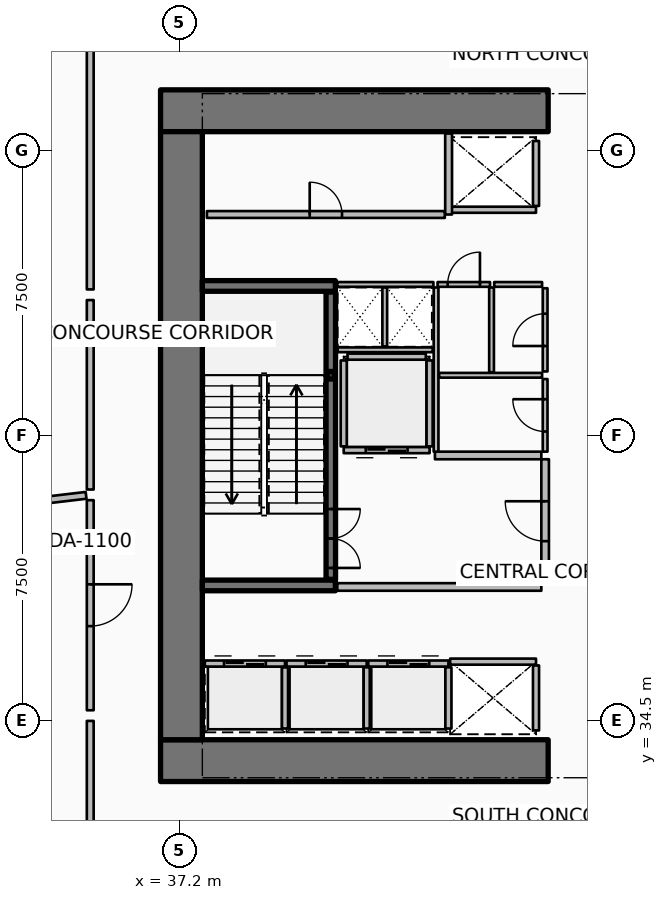
"""IFC4 building model, lengths in metres.
Left out: names, types, materials, properties, quantities, classifications, styles, units other than length and angle.
Written with IfcOpenShell. Run it as: python <this file> out.ifc"""

import sys

from ifc_helpers import new_model, si_unit, direction, frame, frame_2d, origin, origin_2d, place, context, subcontext, project, spatial, rectangle, hollow_rectangle, extrude, element, fill, save


model = new_model("IFC4")
c1 = context("Model", 3, precision=1e-05, world=origin(), true_north=direction((0.0, 1.0)))
c2 = subcontext(c1, "Body", "Model", "MODEL_VIEW")
j1 = project(units=[si_unit("LENGTHUNIT", "METRE"), si_unit("PLANEANGLEUNIT", "RADIAN")], contexts=[c1])
p1 = place(None, origin())
s1 = spatial("IfcSite", under=j1, at=p1, CompositionType="ELEMENT")
p2 = place(p1, origin())
s2 = spatial("IfcBuilding", under=s1, at=p2, CompositionType="ELEMENT")
p3 = place(p2, frame((0.0, 0.0, 16.8)))
s3 = spatial("IfcBuildingStorey", under=s2, at=p3, CompositionType="ELEMENT", Elevation=16.8)
for number, where, z_axis, x_axis in (
    (1, (36.7, 33.45, 0.0), (0.0, 0.0, 1.0), (1.0, 0.0, 0.0)),
    (2, (36.7, 50.55, 0.0), (0.0, 0.0, 1.0), (1.0, 0.0, 0.0)),
):
    element("IfcWall", number, at=place(p3, frame(where, z_axis=z_axis, x_axis=x_axis)), inside=s3, PredefinedType="SHEAR", context=c2, shape_type="SweptSolid", body=[
        extrude(rectangle(XDim=10.2, YDim=1.1, at=frame_2d((5.1, 0.0))), origin(), (0.0, 0.0, 1.0), 4.8),
    ])
p4 = place(p3, frame((37.25, 34.0, 0.0), z_axis=(0.0, 0.0, 1.0), x_axis=(0.0, 1.0, 0.0)))
e3 = element("IfcWall", 3, at=p4, inside=s3, PredefinedType="SHEAR", context=c2, shape_type="SweptSolid", body=[
    extrude(rectangle(XDim=16.0, YDim=1.1, at=frame_2d((8.0, 0.0))), origin(), (0.0, 0.0, 1.0), 4.8),
])
for number, where, z_axis, x_axis in (
    (4, (37.8, 38.06, 0.0), (0.0, 0.0, 1.0), (1.0, 0.0, 0.0)),
    (5, (37.8, 45.94, 0.0), (0.0, 0.0, 1.0), (1.0, 0.0, 0.0)),
):
    element("IfcWall", number, at=place(p3, frame(where, z_axis=z_axis, x_axis=x_axis)), inside=s3, PredefinedType="SHEAR", context=c2, shape_type="SweptSolid", body=[
        extrude(rectangle(XDim=3.5, YDim=0.28, at=frame_2d((1.75, 0.0))), origin(), (0.0, 0.0, 1.0), 4.8),
    ])
p5 = place(p3, frame((41.18, 43.59, 0.0), z_axis=(0.0, 0.0, 1.0), x_axis=(1.0, 0.0, 0.0)))
e6 = element("IfcColumn", 6, at=p5, inside=s3, PredefinedType="COLUMN", context=c2, shape_type="SweptSolid", body=[
    extrude(hollow_rectangle(XDim=0.2, YDim=0.2, WallThickness=0.01, InnerFilletRadius=0.01, OuterFilletRadius=0.02, at=origin_2d()), origin(), (0.0, 0.0, 1.0), 2.195),
])
p6 = place(p3, frame((41.18, 38.22, 0.0), z_axis=(0.0, 0.0, 1.0), x_axis=(0.0, 1.0, 0.0)))
e7 = element("IfcWall", 7, at=p6, inside=s3, PredefinedType="SOLIDWALL", context=c2, shape_type="SweptSolid", body=[
    extrude(rectangle(XDim=7.56, YDim=0.25, at=frame_2d((3.78, 0.0))), origin(), (0.0, 0.0, 1.0), 4.4),
])
p7 = place(p6, frame((0.3, 0.0, 0.0)))
e8 = element("IfcOpeningElement", 8, at=p7, cuts=e7, PredefinedType="OPENING", context=c2, shape_type="SweptSolid", body=[
    extrude(rectangle(XDim=1.55, YDim=2.15, at=frame_2d((0.775, 1.075))), frame((0.0, 0.135, 0.0), z_axis=(0.0, -1.0, 0.0), x_axis=(1.0, 0.0, 0.0)), (0.0, 0.0, 1.0), 0.27),
])
p8 = place(p3, frame((37.865, 36.005, 0.0), z_axis=(0.0, 0.0, 1.0), x_axis=(1.0, 0.0, 0.0)))
e9 = element("IfcWall", 9, at=p8, inside=s3, PredefinedType="PARTITIONING", context=c2, shape_type="SweptSolid", body=[
    extrude(rectangle(XDim=2.11, YDim=0.16, at=frame_2d((1.055, 0.0))), origin(), (0.0, 0.0, 1.0), 4.4),
])
p9 = place(p8, frame((0.505, 0.0, 0.0)))
e10 = element("IfcOpeningElement", 10, at=p9, cuts=e9, PredefinedType="OPENING", context=c2, shape_type="SweptSolid", body=[
    extrude(rectangle(XDim=1.1, YDim=2.1, at=frame_2d((0.55, 1.05))), frame((0.0, 0.09, 0.0), z_axis=(0.0, -1.0, 0.0), x_axis=(1.0, 0.0, 0.0)), (0.0, 0.0, 1.0), 0.18),
])
p10 = place(p3, frame((39.975, 34.295, 0.0), z_axis=(0.0, 0.0, 1.0), x_axis=(0.0, 1.0, 0.0)))
e11 = element("IfcWall", 11, at=p10, inside=s3, PredefinedType="PARTITIONING", context=c2, shape_type="SweptSolid", body=[
    extrude(rectangle(XDim=1.61, YDim=0.16, at=frame_2d((0.805, 0.0))), origin(), (0.0, 0.0, 1.0), 4.4),
])
p11 = place(p3, frame((40.015, 36.005, 0.0), z_axis=(0.0, 0.0, 1.0), x_axis=(1.0, 0.0, 0.0)))
e12 = element("IfcWall", 12, at=p11, inside=s3, PredefinedType="PARTITIONING", context=c2, shape_type="SweptSolid", body=[
    extrude(rectangle(XDim=2.11, YDim=0.16, at=frame_2d((1.055, 0.0))), origin(), (0.0, 0.0, 1.0), 4.4),
])
p12 = place(p11, frame((0.505, 0.0, 0.0)))
e13 = element("IfcOpeningElement", 13, at=p12, cuts=e12, PredefinedType="OPENING", context=c2, shape_type="SweptSolid", body=[
    extrude(rectangle(XDim=1.1, YDim=2.1, at=frame_2d((0.55, 1.05))), frame((0.0, 0.09, 0.0), z_axis=(0.0, -1.0, 0.0), x_axis=(1.0, 0.0, 0.0)), (0.0, 0.0, 1.0), 0.18),
])
p13 = place(p3, frame((42.125, 34.295, 0.0), z_axis=(0.0, 0.0, 1.0), x_axis=(0.0, 1.0, 0.0)))
e14 = element("IfcWall", 14, at=p13, inside=s3, PredefinedType="PARTITIONING", context=c2, shape_type="SweptSolid", body=[
    extrude(rectangle(XDim=1.61, YDim=0.16, at=frame_2d((0.805, 0.0))), origin(), (0.0, 0.0, 1.0), 4.4),
])
p14 = place(p3, frame((42.165, 36.005, 0.0), z_axis=(0.0, 0.0, 1.0), x_axis=(1.0, 0.0, 0.0)))
e15 = element("IfcWall", 15, at=p14, inside=s3, PredefinedType="PARTITIONING", context=c2, shape_type="SweptSolid", body=[
    extrude(rectangle(XDim=2.11, YDim=0.16, at=frame_2d((1.055, 0.0))), origin(), (0.0, 0.0, 1.0), 4.4),
])
p15 = place(p14, frame((0.505, 0.0, 0.0)))
e16 = element("IfcOpeningElement", 16, at=p15, cuts=e15, PredefinedType="OPENING", context=c2, shape_type="SweptSolid", body=[
    extrude(rectangle(XDim=1.1, YDim=2.1, at=frame_2d((0.55, 1.05))), frame((0.0, 0.09, 0.0), z_axis=(0.0, -1.0, 0.0), x_axis=(1.0, 0.0, 0.0)), (0.0, 0.0, 1.0), 0.18),
])
p16 = place(p3, frame((44.275, 34.295, 0.0), z_axis=(0.0, 0.0, 1.0), x_axis=(0.0, 1.0, 0.0)))
e17 = element("IfcWall", 17, at=p16, inside=s3, PredefinedType="PARTITIONING", context=c2, shape_type="SweptSolid", body=[
    extrude(rectangle(XDim=1.61, YDim=0.16, at=frame_2d((0.805, 0.0))), origin(), (0.0, 0.0, 1.0), 4.4),
])
p17 = place(p3, frame((46.58, 47.945, 0.0), z_axis=(0.0, 0.0, 1.0), x_axis=(-1.0, 0.0, 0.0)))
e18 = element("IfcWall", 18, at=p17, inside=s3, PredefinedType="PARTITIONING", context=c2, shape_type="SweptSolid", body=[
    extrude(rectangle(XDim=2.26, YDim=0.16, at=frame_2d((1.13, 0.0))), origin(), (0.0, 0.0, 1.0), 4.4),
])
p18 = place(p3, frame((46.58, 48.045, 0.0), z_axis=(0.0, 0.0, 1.0), x_axis=(0.0, 1.0, 0.0)))
e19 = element("IfcWall", 19, at=p18, inside=s3, PredefinedType="PARTITIONING", context=c2, shape_type="SweptSolid", body=[
    extrude(rectangle(XDim=1.71, YDim=0.16, at=frame_2d((0.855, 0.0))), origin(), (0.0, 0.0, 1.0), 4.4),
])
p19 = place(p3, frame((44.32, 36.055, 0.0), z_axis=(0.0, 0.0, 1.0), x_axis=(1.0, 0.0, 0.0)))
e20 = element("IfcWall", 20, at=p19, inside=s3, PredefinedType="PARTITIONING", context=c2, shape_type="SweptSolid", body=[
    extrude(rectangle(XDim=2.26, YDim=0.16, at=frame_2d((1.13, 0.0))), origin(), (0.0, 0.0, 1.0), 4.4),
])
p20 = place(p3, frame((46.58, 34.245, 0.0), z_axis=(0.0, 0.0, 1.0), x_axis=(0.0, 1.0, 0.0)))
e21 = element("IfcWall", 21, at=p20, inside=s3, PredefinedType="PARTITIONING", context=c2, shape_type="SweptSolid", body=[
    extrude(rectangle(XDim=1.71, YDim=0.16, at=frame_2d((0.855, 0.0))), origin(), (0.0, 0.0, 1.0), 4.4),
])
p21 = place(p3, frame((43.78, 41.62, 0.0), z_axis=(0.0, 0.0, 1.0), x_axis=(-1.0, 0.0, 0.0)))
e22 = element("IfcWall", 22, at=p21, inside=s3, PredefinedType="PARTITIONING", context=c2, shape_type="SweptSolid", body=[
    extrude(rectangle(XDim=2.26, YDim=0.16, at=frame_2d((1.13, 0.0))), origin(), (0.0, 0.0, 1.0), 4.4),
])
p22 = place(p21, frame((0.58, 0.0, 0.0)))
e23 = element("IfcOpeningElement", 23, at=p22, cuts=e22, PredefinedType="OPENING", context=c2, shape_type="SweptSolid", body=[
    extrude(rectangle(XDim=1.1, YDim=2.1, at=frame_2d((0.55, 1.05))), frame((0.0, 0.09, 0.0), z_axis=(0.0, -1.0, 0.0), x_axis=(1.0, 0.0, 0.0)), (0.0, 0.0, 1.0), 0.18),
])
for number, where, z_axis, x_axis in (
    (24, (43.78, 41.72, 0.0), (0.0, 0.0, 1.0), (0.0, 1.0, 0.0)),
    (25, (41.52, 41.72, 0.0), (0.0, 0.0, 1.0), (0.0, 1.0, 0.0)),
):
    element("IfcWall", number, at=place(p3, frame(where, z_axis=z_axis, x_axis=x_axis)), inside=s3, PredefinedType="PARTITIONING", context=c2, shape_type="SweptSolid", body=[
        extrude(rectangle(XDim=2.26, YDim=0.16, at=frame_2d((1.13, 0.0))), origin(), (0.0, 0.0, 1.0), 4.4),
    ])
p23 = place(p3, frame((41.62, 44.08, 0.0), z_axis=(0.0, 0.0, 1.0), x_axis=(1.0, 0.0, 0.0)))
e26 = element("IfcWall", 26, at=p23, inside=s3, PredefinedType="PARTITIONING", context=c2, shape_type="SweptSolid", body=[
    extrude(rectangle(XDim=2.06, YDim=0.16, at=frame_2d((1.03, 0.0))), origin(), (0.0, 0.0, 1.0), 4.4),
])
p24 = place(p3, frame((37.92, 47.82, 0.0), z_axis=(0.0, 0.0, 1.0), x_axis=(1.0, 0.0, 0.0)))
e27 = element("IfcWall", 27, at=p24, inside=s3, PredefinedType="PARTITIONING", context=c2, shape_type="SweptSolid", body=[
    extrude(rectangle(XDim=6.26, YDim=0.18, at=frame_2d((3.13, 0.0))), origin(), (0.0, 0.0, 1.0), 4.4),
])
p25 = place(p24, frame((2.705, 0.0, 0.0)))
e28 = element("IfcOpeningElement", 28, at=p25, cuts=e27, PredefinedType="OPENING", context=c2, shape_type="SweptSolid", body=[
    extrude(rectangle(XDim=0.85, YDim=2.06, at=frame_2d((0.425, 1.03))), frame((0.0, 0.1, 0.0), z_axis=(0.0, -1.0, 0.0), x_axis=(1.0, 0.0, 0.0)), (0.0, 0.0, 1.0), 0.2),
])
p26 = place(p3, frame((44.28, 47.82, 0.0), z_axis=(0.0, 0.0, 1.0), x_axis=(0.0, 1.0, 0.0)))
e29 = element("IfcWall", 29, at=p26, inside=s3, PredefinedType="PARTITIONING", context=c2, shape_type="SweptSolid", body=[
    extrude(rectangle(XDim=2.13, YDim=0.18, at=frame_2d((1.065, 0.0))), origin(), (0.0, 0.0, 1.0), 4.4),
])
p27 = place(p3, frame((41.35, 38.02, 0.0), z_axis=(0.0, 0.0, 1.0), x_axis=(1.0, 0.0, 0.0)))
e30 = element("IfcWall", 30, at=p27, inside=s3, PredefinedType="PARTITIONING", context=c2, shape_type="SweptSolid", body=[
    extrude(rectangle(XDim=5.37, YDim=0.2, at=frame_2d((2.685, 0.0))), origin(), (0.0, 0.0, 1.0), 4.4),
])
p28 = place(p3, frame((43.92, 41.48, 0.0), z_axis=(0.0, 0.0, 1.0), x_axis=(1.0, 0.0, 0.0)))
e31 = element("IfcWall", 31, at=p28, inside=s3, PredefinedType="PARTITIONING", context=c2, shape_type="SweptSolid", body=[
    extrude(rectangle(XDim=2.8, YDim=0.2, at=frame_2d((1.4, 0.0))), origin(), (0.0, 0.0, 1.0), 4.4),
])
p29 = place(p3, frame((46.82, 38.12, 0.0), z_axis=(0.0, 0.0, 1.0), x_axis=(0.0, 1.0, 0.0)))
e32 = element("IfcWall", 32, at=p29, inside=s3, PredefinedType="PARTITIONING", context=c2, shape_type="SweptSolid", body=[
    extrude(rectangle(XDim=3.26, YDim=0.2, at=frame_2d((1.63, 0.0))), origin(), (0.0, 0.0, 1.0), 4.4),
])
p30 = place(p29, frame((1.105, 0.0, 0.0)))
e33 = element("IfcOpeningElement", 33, at=p30, cuts=e32, PredefinedType="OPENING", context=c2, shape_type="SweptSolid", body=[
    extrude(rectangle(XDim=1.05, YDim=2.1, at=frame_2d((0.525, 1.05))), frame((0.0, 0.11, 0.0), z_axis=(0.0, -1.0, 0.0), x_axis=(1.0, 0.0, 0.0)), (0.0, 0.0, 1.0), 0.22),
])
p31 = place(p3, frame((41.36, 44.26, 0.0), z_axis=(0.0, 0.0, 1.0), x_axis=(1.0, 0.0, 0.0)))
e34 = element("IfcWall", 34, at=p31, inside=s3, PredefinedType="PARTITIONING", context=c2, shape_type="SweptSolid", body=[
    extrude(rectangle(XDim=2.5, YDim=0.125, at=frame_2d((1.25, 0.0))), origin(), (0.0, 0.0, 1.0), 3.84),
])
p32 = place(p3, frame((42.6, 44.35, 0.0), z_axis=(0.0, 0.0, 1.0), x_axis=(0.0, 1.0, 0.0)))
e35 = element("IfcWall", 35, at=p32, inside=s3, PredefinedType="PARTITIONING", context=c2, shape_type="SweptSolid", body=[
    extrude(rectangle(XDim=1.55, YDim=0.125, at=frame_2d((0.775, 0.0))), origin(), (0.0, 0.0, 1.0), 3.84),
])
p33 = place(p3, frame((43.95, 41.58, 0.0), z_axis=(0.0, 0.0, 1.0), x_axis=(0.0, 1.0, 0.0)))
e36 = element("IfcWall", 36, at=p33, inside=s3, PredefinedType="PARTITIONING", context=c2, shape_type="SweptSolid", body=[
    extrude(rectangle(XDim=4.32, YDim=0.125, at=frame_2d((2.16, 0.0))), origin(), (0.0, 0.0, 1.0), 3.84),
])
p34 = place(p3, frame((44.03, 43.59, 0.0), z_axis=(0.0, 0.0, 1.0), x_axis=(1.0, 0.0, 0.0)))
e37 = element("IfcWall", 37, at=p34, inside=s3, PredefinedType="PARTITIONING", context=c2, shape_type="SweptSolid", body=[
    extrude(rectangle(XDim=2.71, YDim=0.125, at=frame_2d((1.355, 0.0))), origin(), (0.0, 0.0, 1.0), 3.84),
])
p35 = place(p3, frame((45.41, 43.67, 0.0), z_axis=(0.0, 0.0, 1.0), x_axis=(0.0, 1.0, 0.0)))
e38 = element("IfcWall", 38, at=p35, inside=s3, PredefinedType="PARTITIONING", context=c2, shape_type="SweptSolid", body=[
    extrude(rectangle(XDim=2.23, YDim=0.125, at=frame_2d((1.115, 0.0))), origin(), (0.0, 0.0, 1.0), 3.84),
])
p36 = place(p3, frame((46.82, 41.58, 0.0), z_axis=(0.0, 0.0, 1.0), x_axis=(0.0, 1.0, 0.0)))
e39 = element("IfcWall", 39, at=p36, inside=s3, PredefinedType="PARTITIONING", context=c2, shape_type="SweptSolid", body=[
    extrude(rectangle(XDim=1.91, YDim=0.125, at=frame_2d((0.955, 0.0))), origin(), (0.0, 0.0, 1.0), 3.84),
])
p37 = place(p36, frame((0.53, 0.0, 0.0)))
e40 = element("IfcOpeningElement", 40, at=p37, cuts=e39, PredefinedType="OPENING", context=c2, shape_type="SweptSolid", body=[
    extrude(rectangle(XDim=0.85, YDim=2.06, at=frame_2d((0.425, 1.03))), frame((0.0, 0.073, 0.0), z_axis=(0.0, -1.0, 0.0), x_axis=(1.0, 0.0, 0.0)), (0.0, 0.0, 1.0), 0.145),
])
p38 = place(p3, frame((46.82, 43.69, 0.0), z_axis=(0.0, 0.0, 1.0), x_axis=(0.0, 1.0, 0.0)))
e41 = element("IfcWall", 41, at=p38, inside=s3, PredefinedType="PARTITIONING", context=c2, shape_type="SweptSolid", body=[
    extrude(rectangle(XDim=2.19, YDim=0.125, at=frame_2d((1.095, 0.0))), origin(), (0.0, 0.0, 1.0), 3.84),
])
p39 = place(p38, frame((0.67, 0.0, 0.0)))
e42 = element("IfcOpeningElement", 42, at=p39, cuts=e41, PredefinedType="OPENING", context=c2, shape_type="SweptSolid", body=[
    extrude(rectangle(XDim=0.85, YDim=2.06, at=frame_2d((0.425, 1.03))), frame((0.0, 0.073, 0.0), z_axis=(0.0, -1.0, 0.0), x_axis=(1.0, 0.0, 0.0)), (0.0, 0.0, 1.0), 0.145),
])
p40 = place(p3, frame((41.35, 45.98, 0.0), z_axis=(0.0, 0.0, 1.0), x_axis=(1.0, 0.0, 0.0)))
e43 = element("IfcWall", 43, at=p40, inside=s3, PredefinedType="PARTITIONING", context=c2, shape_type="SweptSolid", body=[
    extrude(rectangle(XDim=2.53, YDim=0.125, at=frame_2d((1.265, 0.0))), origin(), (0.0, 0.0, 1.0), 3.84),
])
p41 = place(p3, frame((43.99, 45.98, 0.0), z_axis=(0.0, 0.0, 1.0), x_axis=(1.0, 0.0, 0.0)))
e44 = element("IfcWall", 44, at=p41, inside=s3, PredefinedType="PARTITIONING", context=c2, shape_type="SweptSolid", body=[
    extrude(rectangle(XDim=1.38, YDim=0.125, at=frame_2d((0.69, 0.0))), origin(), (0.0, 0.0, 1.0), 3.84),
])
p42 = place(p41, frame((0.265, 0.0, 0.0)))
e45 = element("IfcOpeningElement", 45, at=p42, cuts=e44, PredefinedType="OPENING", context=c2, shape_type="SweptSolid", body=[
    extrude(rectangle(XDim=0.85, YDim=2.06, at=frame_2d((0.425, 1.03))), frame((0.0, 0.073, 0.0), z_axis=(0.0, -1.0, 0.0), x_axis=(1.0, 0.0, 0.0)), (0.0, 0.0, 1.0), 0.145),
])
p43 = place(p3, frame((45.48, 45.98, 0.0), z_axis=(0.0, 0.0, 1.0), x_axis=(1.0, 0.0, 0.0)))
e46 = element("IfcWall", 46, at=p43, inside=s3, PredefinedType="PARTITIONING", context=c2, shape_type="SweptSolid", body=[
    extrude(rectangle(XDim=1.26, YDim=0.125, at=frame_2d((0.63, 0.0))), origin(), (0.0, 0.0, 1.0), 3.84),
])
p44 = place(p3, frame((34.85, 52.227, 0.0), z_axis=(0.0, 0.0, 1.0), x_axis=(0.0, -1.0, 0.0)))
e47 = element("IfcWall", 47, at=p44, inside=s3, PredefinedType="PARTITIONING", context=c2, shape_type="SweptSolid", body=[
    extrude(rectangle(XDim=6.378, YDim=0.18, at=frame_2d((3.189, 0.0))), origin(), (0.0, 0.0, 1.0), 3.613),
])
p45 = place(p3, frame((34.85, 45.569, 0.0), z_axis=(0.0, 0.0, 1.0), x_axis=(0.0, -1.0, 0.0)))
e48 = element("IfcWall", 48, at=p45, inside=s3, PredefinedType="PARTITIONING", context=c2, shape_type="SweptSolid", body=[
    extrude(rectangle(XDim=4.985, YDim=0.18, at=frame_2d((2.493, 0.0))), origin(), (0.0, 0.0, 1.0), 3.613),
])
p46 = place(p3, frame((34.741, 40.431, 0.0), z_axis=(0.0, 0.0, 1.0), x_axis=(-0.993068662125, -0.117535663975, 0.0)))
e49 = element("IfcWall", 49, at=p46, inside=s3, PredefinedType="PARTITIONING", context=c2, shape_type="SweptSolid", body=[
    extrude(rectangle(XDim=21.989, YDim=0.18, at=frame_2d((10.994, 0.0))), origin(), (0.0, 0.0, 1.0), 3.613),
])
p47 = place(p3, frame((34.85, 40.304, 0.0), z_axis=(0.0, 0.0, 1.0), x_axis=(0.0, -1.0, 0.0)))
e50 = element("IfcWall", 50, at=p47, inside=s3, PredefinedType="PARTITIONING", context=c2, shape_type="SweptSolid", body=[
    extrude(rectangle(XDim=5.528, YDim=0.18, at=frame_2d((2.764, 0.0))), origin(), (0.0, 0.0, 1.0), 3.613),
])
p48 = place(p47, frame((2.214, 0.0, 0.0)))
e51 = element("IfcOpeningElement", 51, at=p48, cuts=e50, PredefinedType="OPENING", context=c2, shape_type="SweptSolid", body=[
    extrude(rectangle(XDim=1.1, YDim=2.1, at=frame_2d((0.55, 1.05))), frame((0.0, 0.1, 0.0), z_axis=(0.0, -1.0, 0.0), x_axis=(1.0, 0.0, 0.0)), (0.0, 0.0, 1.0), 0.2),
])
p49 = place(p3, frame((34.85, 34.496, 0.0), z_axis=(0.0, 0.0, 1.0), x_axis=(0.0, -1.0, 0.0)))
e52 = element("IfcWall", 52, at=p49, inside=s3, PredefinedType="PARTITIONING", context=c2, shape_type="SweptSolid", body=[
    extrude(rectangle(XDim=3.306, YDim=0.18, at=frame_2d((1.653, 0.0))), origin(), (0.0, 0.0, 1.0), 3.613),
])
p50 = place(p7, origin())
e53 = element("IfcDoor", 53, at=p50, inside=s3, OperationType="DOUBLE_DOOR_SINGLE_SWING", PredefinedType="DOOR", context=c2, shape_type="SweptSolid", body=[
    extrude(rectangle(XDim=1.55, YDim=2.15, at=frame_2d((0.775, 1.075))), frame((0.0, 0.025, 0.0), z_axis=(0.0, -1.0, 0.0), x_axis=(1.0, 0.0, 0.0)), (0.0, 0.0, 1.0), 0.05),
])
fill(e8, e53)
p51 = place(p9, origin())
e54 = element("IfcDoor", 54, at=p51, inside=s3, OperationType="DOUBLE_DOOR_SLIDING", PredefinedType="DOOR", context=c2, shape_type="SweptSolid", body=[
    extrude(rectangle(XDim=1.1, YDim=2.1, at=frame_2d((0.55, 1.05))), frame((0.0, 0.025, 0.0), z_axis=(0.0, -1.0, 0.0), x_axis=(1.0, 0.0, 0.0)), (0.0, 0.0, 1.0), 0.05),
])
fill(e10, e54)
p52 = place(p12, origin())
e55 = element("IfcDoor", 55, at=p52, inside=s3, OperationType="DOUBLE_DOOR_SLIDING", PredefinedType="DOOR", context=c2, shape_type="SweptSolid", body=[
    extrude(rectangle(XDim=1.1, YDim=2.1, at=frame_2d((0.55, 1.05))), frame((0.0, 0.025, 0.0), z_axis=(0.0, -1.0, 0.0), x_axis=(1.0, 0.0, 0.0)), (0.0, 0.0, 1.0), 0.05),
])
fill(e13, e55)
p53 = place(p15, origin())
e56 = element("IfcDoor", 56, at=p53, inside=s3, OperationType="DOUBLE_DOOR_SLIDING", PredefinedType="DOOR", context=c2, shape_type="SweptSolid", body=[
    extrude(rectangle(XDim=1.1, YDim=2.1, at=frame_2d((0.55, 1.05))), frame((0.0, 0.025, 0.0), z_axis=(0.0, -1.0, 0.0), x_axis=(1.0, 0.0, 0.0)), (0.0, 0.0, 1.0), 0.05),
])
fill(e16, e56)
p54 = place(p22, origin())
e57 = element("IfcDoor", 57, at=p54, inside=s3, OperationType="DOUBLE_DOOR_SLIDING", PredefinedType="DOOR", context=c2, shape_type="SweptSolid", body=[
    extrude(rectangle(XDim=1.1, YDim=2.1, at=frame_2d((0.55, 1.05))), frame((0.0, 0.025, 0.0), z_axis=(0.0, -1.0, 0.0), x_axis=(1.0, 0.0, 0.0)), (0.0, 0.0, 1.0), 0.05),
])
fill(e23, e57)
p55 = place(p25, origin())
e58 = element("IfcDoor", 58, at=p55, inside=s3, OperationType="SINGLE_SWING_LEFT", PredefinedType="DOOR", context=c2, shape_type="SweptSolid", body=[
    extrude(rectangle(XDim=0.85, YDim=2.06, at=frame_2d((0.425, 1.03))), frame((0.0, 0.025, 0.0), z_axis=(0.0, -1.0, 0.0), x_axis=(1.0, 0.0, 0.0)), (0.0, 0.0, 1.0), 0.05),
])
fill(e28, e58)
p56 = place(p30, origin())
e59 = element("IfcDoor", 59, at=p56, inside=s3, OperationType="SINGLE_SWING_RIGHT", PredefinedType="DOOR", context=c2, shape_type="SweptSolid", body=[
    extrude(rectangle(XDim=1.05, YDim=2.1, at=frame_2d((0.525, 1.05))), frame((0.0, 0.025, 0.0), z_axis=(0.0, -1.0, 0.0), x_axis=(1.0, 0.0, 0.0)), (0.0, 0.0, 1.0), 0.05),
])
fill(e33, e59)
p57 = place(p37, origin())
e60 = element("IfcDoor", 60, at=p57, inside=s3, OperationType="SINGLE_SWING_RIGHT", PredefinedType="DOOR", context=c2, shape_type="SweptSolid", body=[
    extrude(rectangle(XDim=0.85, YDim=2.06, at=frame_2d((0.425, 1.03))), frame((0.0, 0.025, 0.0), z_axis=(0.0, -1.0, 0.0), x_axis=(1.0, 0.0, 0.0)), (0.0, 0.0, 1.0), 0.05),
])
fill(e40, e60)
p58 = place(p39, origin())
e61 = element("IfcDoor", 61, at=p58, inside=s3, OperationType="SINGLE_SWING_LEFT", PredefinedType="DOOR", context=c2, shape_type="SweptSolid", body=[
    extrude(rectangle(XDim=0.85, YDim=2.06, at=frame_2d((0.425, 1.03))), frame((0.0, 0.025, 0.0), z_axis=(0.0, -1.0, 0.0), x_axis=(1.0, 0.0, 0.0)), (0.0, 0.0, 1.0), 0.05),
])
fill(e42, e61)
p59 = place(p42, origin())
e62 = element("IfcDoor", 62, at=p59, inside=s3, OperationType="SINGLE_SWING_RIGHT", PredefinedType="DOOR", context=c2, shape_type="SweptSolid", body=[
    extrude(rectangle(XDim=0.85, YDim=2.06, at=frame_2d((0.425, 1.03))), frame((0.0, 0.025, 0.0), z_axis=(0.0, -1.0, 0.0), x_axis=(1.0, 0.0, 0.0)), (0.0, 0.0, 1.0), 0.05),
])
fill(e45, e62)
p60 = place(p48, origin())
e63 = element("IfcDoor", 63, at=p60, inside=s3, OperationType="SINGLE_SWING_LEFT", PredefinedType="DOOR", context=c2, shape_type="SweptSolid", body=[
    extrude(rectangle(XDim=1.1, YDim=2.1, at=frame_2d((0.55, 1.05))), frame((0.0, 0.025, 0.0), z_axis=(0.0, -1.0, 0.0), x_axis=(1.0, 0.0, 0.0)), (0.0, 0.0, 1.0), 0.05),
])
fill(e51, e63)
save(model, sys.argv[1])
